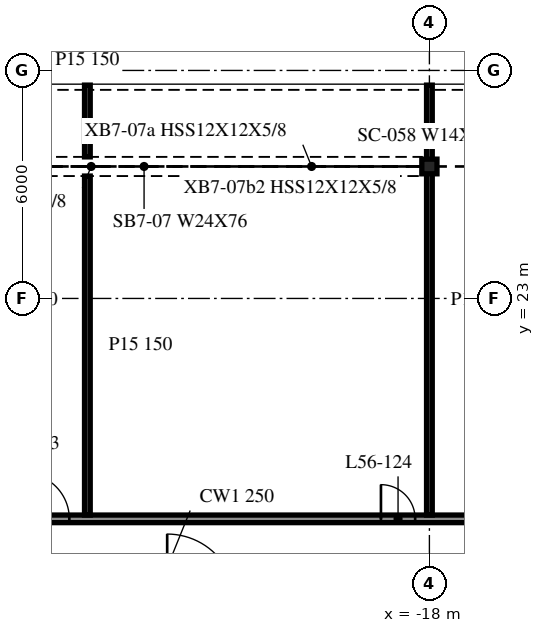
"""IFC4 building model, lengths in metres.
Left out: names, types, materials, properties, quantities, classifications, styles, units other than length and angle.
Written with IfcOpenShell. Run it as: python <this file> out.ifc"""

import sys

from ifc_helpers import new_model, si_unit, direction, frame, frame_2d, origin, origin_2d, place, context, subcontext, project, spatial, rectangle, i_section, extrude, element, fill, save


model = new_model("IFC4")
c1 = context("Model", 3, precision=1e-05, world=origin(), true_north=direction((0.0, 1.0)))
c2 = subcontext(c1, "Body", "Model", "MODEL_VIEW")
j1 = project(units=[si_unit("LENGTHUNIT", "METRE"), si_unit("PLANEANGLEUNIT", "RADIAN")], contexts=[c1])
p1 = place(None, origin())
s1 = spatial("IfcSite", under=j1, at=p1, CompositionType="ELEMENT")
p2 = place(p1, origin())
s2 = spatial("IfcBuilding", under=s1, at=p2, CompositionType="ELEMENT")
p3 = place(p2, frame((0.0, 0.0, 232.4)))
s3 = spatial("IfcBuildingStorey", under=s2, at=p3, CompositionType="ELEMENT", Elevation=232.4)
p4 = place(p3, frame((-18.0, 26.473, -0.34), z_axis=(0.0, 0.0, 1.0), x_axis=(1.0, 0.0, 0.0)))
e1 = element("IfcColumn", 1, at=p4, inside=s3, PredefinedType="COLUMN", context=c2, shape_type="SweptSolid", body=[
    extrude(i_section(OverallWidth=0.399, OverallDepth=0.386, WebThickness=0.021, FlangeThickness=0.033, at=origin_2d()), origin(), (0.0, 0.0, 1.0), 3.8),
])
p5 = place(p3, frame((-41.975, 17.2, 0.0), z_axis=(0.0, 0.0, 1.0), x_axis=(1.0, 0.0, 0.0)))
e2 = element("IfcWall", 2, at=p5, inside=s3, PredefinedType="PARTITIONING", context=c2, shape_type="SweptSolid", body=[
    extrude(rectangle(XDim=95.95, YDim=0.2, at=frame_2d((47.975, 0.0))), origin(), (0.0, 0.0, 1.0), 3.46),
])
p6 = place(p5, frame((10.7, 0.0, 0.0)))
e3 = element("IfcOpeningElement", 3, at=p6, cuts=e2, PredefinedType="OPENING", context=c2, shape_type="SweptSolid", body=[
    extrude(rectangle(XDim=0.9, YDim=2.1, at=frame_2d((0.45, 1.05))), frame((0.0, 0.11, 0.0), z_axis=(0.0, -1.0, 0.0), x_axis=(1.0, 0.0, 0.0)), (0.0, 0.0, 1.0), 0.22),
])
p7 = place(p5, frame((13.3, 0.0, 0.0)))
e4 = element("IfcOpeningElement", 4, at=p7, cuts=e2, PredefinedType="OPENING", context=c2, shape_type="SweptSolid", body=[
    extrude(rectangle(XDim=1.2, YDim=2.1, at=frame_2d((0.6, 1.05))), frame((0.0, 0.11, 0.0), z_axis=(0.0, -1.0, 0.0), x_axis=(1.0, 0.0, 0.0)), (0.0, 0.0, 1.0), 0.22),
])
p8 = place(p5, frame((22.7, 0.0, 0.0)))
e5 = element("IfcOpeningElement", 5, at=p8, cuts=e2, PredefinedType="OPENING", context=c2, shape_type="SweptSolid", body=[
    extrude(rectangle(XDim=0.9, YDim=2.1, at=frame_2d((0.45, 1.05))), frame((0.0, 0.11, 0.0), z_axis=(0.0, -1.0, 0.0), x_axis=(1.0, 0.0, 0.0)), (0.0, 0.0, 1.0), 0.22),
])
p9 = place(p5, frame((28.3, 0.0, 0.0)))
e6 = element("IfcOpeningElement", 6, at=p9, cuts=e2, PredefinedType="OPENING", context=c2, shape_type="SweptSolid", body=[
    extrude(rectangle(XDim=1.2, YDim=2.1, at=frame_2d((0.6, 1.05))), frame((0.0, 0.11, 0.0), z_axis=(0.0, -1.0, 0.0), x_axis=(1.0, 0.0, 0.0)), (0.0, 0.0, 1.0), 0.22),
])
p10 = place(p5, frame((40.3, 0.0, 0.0)))
e7 = element("IfcOpeningElement", 7, at=p10, cuts=e2, PredefinedType="OPENING", context=c2, shape_type="SweptSolid", body=[
    extrude(rectangle(XDim=1.2, YDim=2.1, at=frame_2d((0.6, 1.05))), frame((0.0, 0.11, 0.0), z_axis=(0.0, -1.0, 0.0), x_axis=(1.0, 0.0, 0.0)), (0.0, 0.0, 1.0), 0.22),
])
p11 = place(p5, frame((43.7, 0.0, 0.0)))
e8 = element("IfcOpeningElement", 8, at=p11, cuts=e2, PredefinedType="OPENING", context=c2, shape_type="SweptSolid", body=[
    extrude(rectangle(XDim=0.9, YDim=2.1, at=frame_2d((0.45, 1.05))), frame((0.0, 0.11, 0.0), z_axis=(0.0, -1.0, 0.0), x_axis=(1.0, 0.0, 0.0)), (0.0, 0.0, 1.0), 0.22),
])
p12 = place(p5, frame((47.3, 0.0, 0.0)))
e9 = element("IfcOpeningElement", 9, at=p12, cuts=e2, PredefinedType="OPENING", context=c2, shape_type="SweptSolid", body=[
    extrude(rectangle(XDim=1.2, YDim=2.1, at=frame_2d((0.6, 1.05))), frame((0.0, 0.11, 0.0), z_axis=(0.0, -1.0, 0.0), x_axis=(1.0, 0.0, 0.0)), (0.0, 0.0, 1.0), 0.22),
])
p13 = place(p5, frame((54.1, 0.0, 0.0)))
e10 = element("IfcOpeningElement", 10, at=p13, cuts=e2, PredefinedType="OPENING", context=c2, shape_type="SweptSolid", body=[
    extrude(rectangle(XDim=0.9, YDim=2.1, at=frame_2d((0.45, 1.05))), frame((0.0, 0.11, 0.0), z_axis=(0.0, -1.0, 0.0), x_axis=(1.0, 0.0, 0.0)), (0.0, 0.0, 1.0), 0.22),
])
p14 = place(p5, frame((60.1, 0.0, 0.0)))
e11 = element("IfcOpeningElement", 11, at=p14, cuts=e2, PredefinedType="OPENING", context=c2, shape_type="SweptSolid", body=[
    extrude(rectangle(XDim=1.2, YDim=2.1, at=frame_2d((0.6, 1.05))), frame((0.0, 0.11, 0.0), z_axis=(0.0, -1.0, 0.0), x_axis=(1.0, 0.0, 0.0)), (0.0, 0.0, 1.0), 0.22),
])
p15 = place(p5, frame((72.1, 0.0, 0.0)))
e12 = element("IfcOpeningElement", 12, at=p15, cuts=e2, PredefinedType="OPENING", context=c2, shape_type="SweptSolid", body=[
    extrude(rectangle(XDim=1.2, YDim=2.1, at=frame_2d((0.6, 1.05))), frame((0.0, 0.11, 0.0), z_axis=(0.0, -1.0, 0.0), x_axis=(1.0, 0.0, 0.0)), (0.0, 0.0, 1.0), 0.22),
])
p16 = place(p5, frame((75.1, 0.0, 0.0)))
e13 = element("IfcOpeningElement", 13, at=p16, cuts=e2, PredefinedType="OPENING", context=c2, shape_type="SweptSolid", body=[
    extrude(rectangle(XDim=0.9, YDim=2.1, at=frame_2d((0.45, 1.05))), frame((0.0, 0.11, 0.0), z_axis=(0.0, -1.0, 0.0), x_axis=(1.0, 0.0, 0.0)), (0.0, 0.0, 1.0), 0.22),
])
p17 = place(p5, frame((84.1, 0.0, 0.0)))
e14 = element("IfcOpeningElement", 14, at=p17, cuts=e2, PredefinedType="OPENING", context=c2, shape_type="SweptSolid", body=[
    extrude(rectangle(XDim=1.2, YDim=2.1, at=frame_2d((0.6, 1.05))), frame((0.0, 0.11, 0.0), z_axis=(0.0, -1.0, 0.0), x_axis=(1.0, 0.0, 0.0)), (0.0, 0.0, 1.0), 0.22),
])
p18 = place(p5, frame((90.1, 0.0, 0.0)))
e15 = element("IfcOpeningElement", 15, at=p18, cuts=e2, PredefinedType="OPENING", context=c2, shape_type="SweptSolid", body=[
    extrude(rectangle(XDim=0.9, YDim=2.1, at=frame_2d((0.45, 1.05))), frame((0.0, 0.11, 0.0), z_axis=(0.0, -1.0, 0.0), x_axis=(1.0, 0.0, 0.0)), (0.0, 0.0, 1.0), 0.22),
])
p19 = place(p3, frame((-27.0, 17.3, 0.0), z_axis=(0.0, 0.0, 1.0), x_axis=(0.0, 1.0, 0.0)))
e16 = element("IfcWall", 16, at=p19, inside=s3, PredefinedType="PARTITIONING", context=c2, shape_type="SweptSolid", body=[
    extrude(rectangle(XDim=8.921, YDim=0.15, at=frame_2d((4.46, 0.0))), origin(), (0.0, 0.0, 1.0), 3.46),
])
p20 = place(p3, frame((-27.0, 26.725, 0.0), z_axis=(0.0, 0.0, 1.0), x_axis=(0.0, 1.0, 0.0)))
e17 = element("IfcWall", 17, at=p20, inside=s3, PredefinedType="PARTITIONING", context=c2, shape_type="SweptSolid", body=[
    extrude(rectangle(XDim=1.889, YDim=0.15, at=frame_2d((0.944, 0.0))), origin(), (0.0, 0.0, 1.0), 3.46),
])
p21 = place(p3, frame((-18.0, 17.3, 0.0), z_axis=(0.0, 0.0, 1.0), x_axis=(0.0, 1.0, 0.0)))
e18 = element("IfcWall", 18, at=p21, inside=s3, PredefinedType="PARTITIONING", context=c2, shape_type="SweptSolid", body=[
    extrude(rectangle(XDim=11.314, YDim=0.15, at=frame_2d((5.657, 0.0))), origin(), (0.0, 0.0, 1.0), 3.46),
])
p22 = place(p7, origin())
e19 = element("IfcDoor", 19, at=p22, inside=s3, OperationType="SINGLE_SWING_LEFT", PredefinedType="DOOR", context=c2, shape_type="SweptSolid", body=[
    extrude(rectangle(XDim=1.2, YDim=2.1, at=frame_2d((0.6, 1.05))), frame((0.0, 0.025, 0.0), z_axis=(0.0, -1.0, 0.0), x_axis=(1.0, 0.0, 0.0)), (0.0, 0.0, 1.0), 0.05),
])
fill(e4, e19)
p23 = place(p8, origin())
e20 = element("IfcDoor", 20, at=p23, inside=s3, OperationType="SINGLE_SWING_LEFT", PredefinedType="DOOR", context=c2, shape_type="SweptSolid", body=[
    extrude(rectangle(XDim=0.9, YDim=2.1, at=frame_2d((0.45, 1.05))), frame((0.0, 0.025, 0.0), z_axis=(0.0, -1.0, 0.0), x_axis=(1.0, 0.0, 0.0)), (0.0, 0.0, 1.0), 0.05),
])
fill(e5, e20)
save(model, sys.argv[1])
